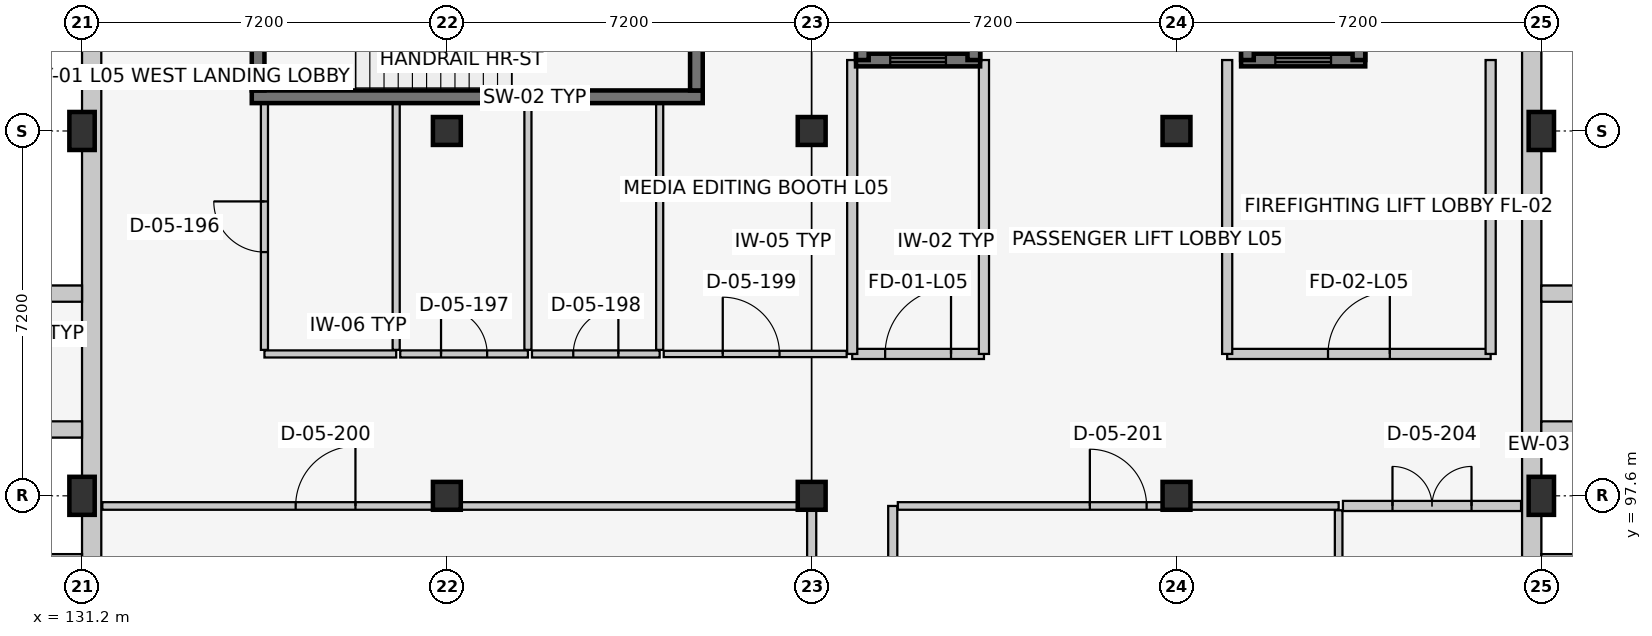
"""IFC4 building model, lengths in metres.
Left out: names, types, materials, properties, quantities, classifications, styles, units other than length and angle.
Written with IfcOpenShell. Run it as: python <this file> out.ifc"""

import sys

from ifc_helpers import new_model, si_unit, direction, frame, frame_2d, origin, origin_2d, place, context, subcontext, project, spatial, rectangle, extrude, element, fill, save


model = new_model("IFC4")
c1 = context("Model", 3, precision=1e-05, world=origin(), true_north=direction((0.0, 1.0)))
c2 = subcontext(c1, "Body", "Model", "MODEL_VIEW")
j1 = project(units=[si_unit("LENGTHUNIT", "METRE"), si_unit("PLANEANGLEUNIT", "RADIAN")], contexts=[c1])
p1 = place(None, origin())
s1 = spatial("IfcSite", under=j1, at=p1, CompositionType="ELEMENT")
p2 = place(p1, origin())
s2 = spatial("IfcBuilding", under=s1, at=p2, CompositionType="ELEMENT")
p3 = place(p2, frame((0.0, 0.0, 21.9)))
s3 = spatial("IfcBuildingStorey", under=s2, at=p3, CompositionType="ELEMENT", Elevation=21.9)
for number, where, z_axis, x_axis in (
    (1, (131.2, 97.6, 0.0), (0.0, 0.0, 1.0), (1.0, 0.0, 0.0)),
    (2, (131.2, 104.8, 0.0), (0.0, 0.0, 1.0), (1.0, 0.0, 0.0)),
):
    element("IfcColumn", number, at=place(p3, frame(where, z_axis=z_axis, x_axis=x_axis)), inside=s3, PredefinedType="COLUMN", context=c2, shape_type="SweptSolid", body=[
        extrude(rectangle(XDim=0.5, YDim=0.75, at=origin_2d()), origin(), (0.0, 0.0, 1.0), 3.9),
    ])
for number, where, z_axis, x_axis in (
    (3, (138.4, 97.6, 0.0), (0.0, 0.0, 1.0), (1.0, 0.0, 0.0)),
    (4, (138.4, 104.8, 0.0), (0.0, 0.0, 1.0), (1.0, 0.0, 0.0)),
    (5, (145.6, 97.6, 0.0), (0.0, 0.0, 1.0), (1.0, 0.0, 0.0)),
    (6, (145.6, 104.8, 0.0), (0.0, 0.0, 1.0), (1.0, 0.0, 0.0)),
    (7, (152.8, 97.6, 0.0), (0.0, 0.0, 1.0), (1.0, 0.0, 0.0)),
    (8, (152.8, 104.8, 0.0), (0.0, 0.0, 1.0), (1.0, 0.0, 0.0)),
):
    element("IfcColumn", number, at=place(p3, frame(where, z_axis=z_axis, x_axis=x_axis)), inside=s3, PredefinedType="COLUMN", context=c2, shape_type="SweptSolid", body=[
        extrude(rectangle(XDim=0.55, YDim=0.55, at=origin_2d()), origin(), (0.0, 0.0, 1.0), 3.9),
    ])
for number, where, z_axis, x_axis in (
    (9, (160.0, 97.6, 0.0), (0.0, 0.0, 1.0), (1.0, 0.0, 0.0)),
    (10, (160.0, 104.8, 0.0), (0.0, 0.0, 1.0), (1.0, 0.0, 0.0)),
):
    element("IfcColumn", number, at=place(p3, frame(where, z_axis=z_axis, x_axis=x_axis)), inside=s3, PredefinedType="COLUMN", context=c2, shape_type="SweptSolid", body=[
        extrude(rectangle(XDim=0.5, YDim=0.75, at=origin_2d()), origin(), (0.0, 0.0, 1.0), 3.9),
    ])
p4 = place(p3, frame((159.81, 112.0, 0.0), z_axis=(0.0, 0.0, 1.0), x_axis=(0.0, -1.0, 0.0)))
e11 = element("IfcWall", 11, at=p4, inside=s3, PredefinedType="SOLIDWALL", context=c2, shape_type="SweptSolid", body=[
    extrude(rectangle(XDim=28.8, YDim=0.38, at=frame_2d((14.4, 0.0))), origin(), (0.0, 0.0, 1.0), 2.915),
])
for number, where, z_axis, x_axis in (
    (12, (160.0, 96.29, 0.0), (0.0, 0.0, 1.0), (1.0, 0.0, 0.0)),
    (13, (160.0, 98.91, 0.0), (0.0, 0.0, 1.0), (1.0, 0.0, 0.0)),
):
    element("IfcWall", number, at=place(p3, frame(where, z_axis=z_axis, x_axis=x_axis)), inside=s3, PredefinedType="SOLIDWALL", context=c2, shape_type="SweptSolid", body=[
        extrude(rectangle(XDim=1.35, YDim=0.32, at=frame_2d((0.675, 0.0))), origin(), (0.0, 0.0, 1.0), 3.64),
    ])
p5 = place(p3, frame((160.0, 101.59, 0.0), z_axis=(0.0, 0.0, 1.0), x_axis=(1.0, 0.0, 0.0)))
e14 = element("IfcWall", 14, at=p5, inside=s3, PredefinedType="SOLIDWALL", context=c2, shape_type="SweptSolid", body=[
    extrude(rectangle(XDim=1.793, YDim=0.32, at=frame_2d((0.896, 0.0))), origin(), (0.0, 0.0, 1.0), 3.64),
])
p6 = place(p3, frame((131.39, 83.2, 0.0), z_axis=(0.0, 0.0, 1.0), x_axis=(0.0, 1.0, 0.0)))
e15 = element("IfcWall", 15, at=p6, inside=s3, PredefinedType="SOLIDWALL", context=c2, shape_type="SweptSolid", body=[
    extrude(rectangle(XDim=28.8, YDim=0.38, at=frame_2d((14.4, 0.0))), origin(), (0.0, 0.0, 1.0), 2.915),
])
for number, where, z_axis, x_axis in (
    (16, (131.2, 96.29, 0.0), (0.0, 0.0, 1.0), (-1.0, 0.0, 0.0)),
    (17, (131.2, 98.91, 0.0), (0.0, 0.0, 1.0), (-1.0, 0.0, 0.0)),
):
    element("IfcWall", number, at=place(p3, frame(where, z_axis=z_axis, x_axis=x_axis)), inside=s3, PredefinedType="SOLIDWALL", context=c2, shape_type="SweptSolid", body=[
        extrude(rectangle(XDim=1.793, YDim=0.32, at=frame_2d((0.896, 0.0))), origin(), (0.0, 0.0, 1.0), 3.64),
    ])
p7 = place(p3, frame((131.2, 101.59, 0.0), z_axis=(0.0, 0.0, 1.0), x_axis=(-1.0, 0.0, 0.0)))
e18 = element("IfcWall", 18, at=p7, inside=s3, PredefinedType="SOLIDWALL", context=c2, shape_type="SweptSolid", body=[
    extrude(rectangle(XDim=1.35, YDim=0.32, at=frame_2d((0.675, 0.0))), origin(), (0.0, 0.0, 1.0), 3.64),
])
p8 = place(p3, frame((134.55, 105.475, 0.0), z_axis=(0.0, 0.0, 1.0), x_axis=(1.0, 0.0, 0.0)))
e19 = element("IfcWall", 19, at=p8, inside=s3, PredefinedType="SHEAR", context=c2, shape_type="SweptSolid", body=[
    extrude(rectangle(XDim=8.9, YDim=0.25, at=frame_2d((4.45, 0.0))), origin(), (0.0, 0.0, 1.0), 3.66),
])
p9 = place(p3, frame((134.675, 109.45, 0.0), z_axis=(0.0, 0.0, 1.0), x_axis=(0.0, -1.0, 0.0)))
e20 = element("IfcWall", 20, at=p9, inside=s3, PredefinedType="SHEAR", context=c2, shape_type="SweptSolid", body=[
    extrude(rectangle(XDim=3.85, YDim=0.25, at=frame_2d((1.925, 0.0))), origin(), (0.0, 0.0, 1.0), 3.66),
])
p10 = place(p9, frame((1.3, 0.0, 0.0)))
e21 = element("IfcOpeningElement", 21, at=p10, cuts=e20, PredefinedType="OPENING", context=c2, shape_type="SweptSolid", body=[
    extrude(rectangle(XDim=1.25, YDim=2.15, at=frame_2d((0.625, 1.075))), frame((0.0, 0.137, 0.0), z_axis=(0.0, -1.0, 0.0), x_axis=(1.0, 0.0, 0.0)), (0.0, 0.0, 1.0), 0.274),
])
p11 = place(p3, frame((143.325, 105.6, 0.0), z_axis=(0.0, 0.0, 1.0), x_axis=(0.0, 1.0, 0.0)))
e22 = element("IfcWall", 22, at=p11, inside=s3, PredefinedType="SHEAR", context=c2, shape_type="SweptSolid", body=[
    extrude(rectangle(XDim=3.85, YDim=0.25, at=frame_2d((1.925, 0.0))), origin(), (0.0, 0.0, 1.0), 3.66),
])
p12 = place(p3, frame((146.475, 106.2, 0.0), z_axis=(0.0, 0.0, 1.0), x_axis=(1.0, 0.0, 0.0)))
e23 = element("IfcWall", 23, at=p12, inside=s3, PredefinedType="SHEAR", context=c2, shape_type="SweptSolid", body=[
    extrude(rectangle(XDim=2.45, YDim=0.25, at=frame_2d((1.225, 0.0))), origin(), (0.0, 0.0, 1.0), 3.66),
])
p13 = place(p12, frame((0.675, 0.0, 0.0)))
e24 = element("IfcOpeningElement", 24, at=p13, cuts=e23, PredefinedType="OPENING", context=c2, shape_type="SweptSolid", body=[
    extrude(rectangle(XDim=1.1, YDim=2.15, at=frame_2d((0.55, 1.075))), frame((0.0, 0.137, 0.0), z_axis=(0.0, -1.0, 0.0), x_axis=(1.0, 0.0, 0.0)), (0.0, 0.0, 1.0), 0.274),
])
for number, where, z_axis, x_axis in (
    (25, (146.6, 109.2, 0.0), (0.0, 0.0, 1.0), (0.0, -1.0, 0.0)),
    (26, (148.8, 106.2, 0.0), (0.0, 0.0, 1.0), (0.0, 1.0, 0.0)),
):
    element("IfcWall", number, at=place(p3, frame(where, z_axis=z_axis, x_axis=x_axis)), inside=s3, PredefinedType="SHEAR", context=c2, shape_type="SweptSolid", body=[
        extrude(rectangle(XDim=3.0, YDim=0.25, at=frame_2d((1.5, 0.0))), origin(), (0.0, 0.0, 1.0), 3.66),
    ])
p14 = place(p3, frame((146.4, 100.4, 0.0), z_axis=(0.0, 0.0, 1.0), x_axis=(1.0, 0.0, 0.0)))
e27 = element("IfcWall", 27, at=p14, inside=s3, PredefinedType="PARTITIONING", context=c2, shape_type="SweptSolid", body=[
    extrude(rectangle(XDim=2.6, YDim=0.2, at=frame_2d((1.3, 0.0))), origin(), (0.0, 0.0, 1.0), 3.66),
])
p15 = place(p14, frame((0.65, 0.0, 0.0)))
e28 = element("IfcOpeningElement", 28, at=p15, cuts=e27, PredefinedType="OPENING", context=c2, shape_type="SweptSolid", body=[
    extrude(rectangle(XDim=1.3, YDim=2.2, at=frame_2d((0.65, 1.1))), frame((0.0, 0.112, 0.0), z_axis=(0.0, -1.0, 0.0), x_axis=(1.0, 0.0, 0.0)), (0.0, 0.0, 1.0), 0.224),
])
p16 = place(p3, frame((146.4, 106.2, 0.0), z_axis=(0.0, 0.0, 1.0), x_axis=(0.0, -1.0, 0.0)))
e29 = element("IfcWall", 29, at=p16, inside=s3, PredefinedType="PARTITIONING", context=c2, shape_type="SweptSolid", body=[
    extrude(rectangle(XDim=5.8, YDim=0.2, at=frame_2d((2.9, 0.0))), origin(), (0.0, 0.0, 1.0), 3.66),
])
p17 = place(p3, frame((149.0, 100.4, 0.0), z_axis=(0.0, 0.0, 1.0), x_axis=(0.0, 1.0, 0.0)))
e30 = element("IfcWall", 30, at=p17, inside=s3, PredefinedType="PARTITIONING", context=c2, shape_type="SweptSolid", body=[
    extrude(rectangle(XDim=5.8, YDim=0.2, at=frame_2d((2.9, 0.0))), origin(), (0.0, 0.0, 1.0), 3.335),
])
p18 = place(p3, frame((154.075, 106.2, 0.0), z_axis=(0.0, 0.0, 1.0), x_axis=(1.0, 0.0, 0.0)))
e31 = element("IfcWall", 31, at=p18, inside=s3, PredefinedType="SHEAR", context=c2, shape_type="SweptSolid", body=[
    extrude(rectangle(XDim=2.45, YDim=0.25, at=frame_2d((1.225, 0.0))), origin(), (0.0, 0.0, 1.0), 3.66),
])
p19 = place(p18, frame((0.675, 0.0, 0.0)))
e32 = element("IfcOpeningElement", 32, at=p19, cuts=e31, PredefinedType="OPENING", context=c2, shape_type="SweptSolid", body=[
    extrude(rectangle(XDim=1.1, YDim=2.15, at=frame_2d((0.55, 1.075))), frame((0.0, 0.137, 0.0), z_axis=(0.0, -1.0, 0.0), x_axis=(1.0, 0.0, 0.0)), (0.0, 0.0, 1.0), 0.274),
])
for number, where, z_axis, x_axis in (
    (33, (154.2, 109.2, 0.0), (0.0, 0.0, 1.0), (0.0, -1.0, 0.0)),
    (34, (156.4, 106.2, 0.0), (0.0, 0.0, 1.0), (0.0, 1.0, 0.0)),
):
    element("IfcWall", number, at=place(p3, frame(where, z_axis=z_axis, x_axis=x_axis)), inside=s3, PredefinedType="SHEAR", context=c2, shape_type="SweptSolid", body=[
        extrude(rectangle(XDim=3.0, YDim=0.25, at=frame_2d((1.5, 0.0))), origin(), (0.0, 0.0, 1.0), 3.66),
    ])
p20 = place(p3, frame((153.8, 100.4, 0.0), z_axis=(0.0, 0.0, 1.0), x_axis=(1.0, 0.0, 0.0)))
e35 = element("IfcWall", 35, at=p20, inside=s3, PredefinedType="PARTITIONING", context=c2, shape_type="SweptSolid", body=[
    extrude(rectangle(XDim=5.2, YDim=0.2, at=frame_2d((2.6, 0.0))), origin(), (0.0, 0.0, 1.0), 3.66),
])
p21 = place(p20, frame((1.99, 0.0, 0.0)))
e36 = element("IfcOpeningElement", 36, at=p21, cuts=e35, PredefinedType="OPENING", context=c2, shape_type="SweptSolid", body=[
    extrude(rectangle(XDim=1.22, YDim=2.2, at=frame_2d((0.61, 1.1))), frame((0.0, 0.112, 0.0), z_axis=(0.0, -1.0, 0.0), x_axis=(1.0, 0.0, 0.0)), (0.0, 0.0, 1.0), 0.224),
])
for number, where, z_axis, x_axis in (
    (37, (153.8, 106.2, 0.0), (0.0, 0.0, 1.0), (0.0, -1.0, 0.0)),
    (38, (159.0, 100.4, 0.0), (0.0, 0.0, 1.0), (0.0, 1.0, 0.0)),
):
    element("IfcWall", number, at=place(p3, frame(where, z_axis=z_axis, x_axis=x_axis)), inside=s3, PredefinedType="PARTITIONING", context=c2, shape_type="SweptSolid", body=[
        extrude(rectangle(XDim=5.8, YDim=0.2, at=frame_2d((2.9, 0.0))), origin(), (0.0, 0.0, 1.0), 3.66),
    ])
p22 = place(p3, frame((145.6, 90.4, 0.0), z_axis=(0.0, 0.0, 1.0), x_axis=(0.0, 1.0, 0.0)))
e39 = element("IfcWall", 39, at=p22, inside=s3, PredefinedType="PARTITIONING", context=c2, shape_type="SweptSolid", body=[
    extrude(rectangle(XDim=7.0, YDim=0.18, at=frame_2d((3.5, 0.0))), origin(), (0.0, 0.0, 1.0), 3.035),
])
p23 = place(p3, frame((147.2, 90.4, 0.0), z_axis=(0.0, 0.0, 1.0), x_axis=(0.0, 1.0, 0.0)))
e40 = element("IfcWall", 40, at=p23, inside=s3, PredefinedType="PARTITIONING", context=c2, shape_type="SweptSolid", body=[
    extrude(rectangle(XDim=7.0, YDim=0.18, at=frame_2d((3.5, 0.0))), origin(), (0.0, 0.0, 1.0), 3.66),
])
p24 = place(p3, frame((134.8, 100.4, 0.0), z_axis=(0.0, 0.0, 1.0), x_axis=(1.0, 0.0, 0.0)))
e41 = element("IfcWall", 41, at=p24, inside=s3, PredefinedType="PARTITIONING", context=c2, shape_type="SweptSolid", body=[
    extrude(rectangle(XDim=2.6, YDim=0.14, at=frame_2d((1.3, 0.0))), origin(), (0.0, 0.0, 1.0), 3.66),
])
p25 = place(p3, frame((134.8, 100.48, 0.0), z_axis=(0.0, 0.0, 1.0), x_axis=(0.0, 1.0, 0.0)))
e42 = element("IfcWall", 42, at=p25, inside=s3, PredefinedType="PARTITIONING", context=c2, shape_type="SweptSolid", body=[
    extrude(rectangle(XDim=4.86, YDim=0.14, at=frame_2d((2.43, 0.0))), origin(), (0.0, 0.0, 1.0), 3.275),
])
p26 = place(p25, frame((1.93, 0.0, 0.0)))
e43 = element("IfcOpeningElement", 43, at=p26, cuts=e42, PredefinedType="OPENING", context=c2, shape_type="SweptSolid", body=[
    extrude(rectangle(XDim=1.0, YDim=2.1, at=frame_2d((0.5, 1.05))), frame((0.0, 0.082, 0.0), z_axis=(0.0, -1.0, 0.0), x_axis=(1.0, 0.0, 0.0)), (0.0, 0.0, 1.0), 0.164),
])
p27 = place(p3, frame((137.4, 100.48, 0.0), z_axis=(0.0, 0.0, 1.0), x_axis=(0.0, 1.0, 0.0)))
e44 = element("IfcWall", 44, at=p27, inside=s3, PredefinedType="PARTITIONING", context=c2, shape_type="SweptSolid", body=[
    extrude(rectangle(XDim=4.86, YDim=0.14, at=frame_2d((2.43, 0.0))), origin(), (0.0, 0.0, 1.0), 3.66),
])
p28 = place(p3, frame((137.48, 100.4, 0.0), z_axis=(0.0, 0.0, 1.0), x_axis=(1.0, 0.0, 0.0)))
e45 = element("IfcWall", 45, at=p28, inside=s3, PredefinedType="PARTITIONING", context=c2, shape_type="SweptSolid", body=[
    extrude(rectangle(XDim=2.52, YDim=0.14, at=frame_2d((1.26, 0.0))), origin(), (0.0, 0.0, 1.0), 3.66),
])
p29 = place(p28, frame((0.805, 0.0, 0.0)))
e46 = element("IfcOpeningElement", 46, at=p29, cuts=e45, PredefinedType="OPENING", context=c2, shape_type="SweptSolid", body=[
    extrude(rectangle(XDim=0.91, YDim=2.06, at=frame_2d((0.455, 1.03))), frame((0.0, 0.082, 0.0), z_axis=(0.0, -1.0, 0.0), x_axis=(1.0, 0.0, 0.0)), (0.0, 0.0, 1.0), 0.164),
])
p30 = place(p3, frame((140.0, 100.48, 0.0), z_axis=(0.0, 0.0, 1.0), x_axis=(0.0, 1.0, 0.0)))
e47 = element("IfcWall", 47, at=p30, inside=s3, PredefinedType="PARTITIONING", context=c2, shape_type="SweptSolid", body=[
    extrude(rectangle(XDim=4.86, YDim=0.14, at=frame_2d((2.43, 0.0))), origin(), (0.0, 0.0, 1.0), 3.66),
])
p31 = place(p3, frame((140.08, 100.4, 0.0), z_axis=(0.0, 0.0, 1.0), x_axis=(1.0, 0.0, 0.0)))
e48 = element("IfcWall", 48, at=p31, inside=s3, PredefinedType="PARTITIONING", context=c2, shape_type="SweptSolid", body=[
    extrude(rectangle(XDim=2.52, YDim=0.14, at=frame_2d((1.26, 0.0))), origin(), (0.0, 0.0, 1.0), 3.66),
])
p32 = place(p31, frame((0.815, 0.0, 0.0)))
e49 = element("IfcOpeningElement", 49, at=p32, cuts=e48, PredefinedType="OPENING", context=c2, shape_type="SweptSolid", body=[
    extrude(rectangle(XDim=0.89, YDim=2.05, at=frame_2d((0.445, 1.025))), frame((0.0, 0.082, 0.0), z_axis=(0.0, -1.0, 0.0), x_axis=(1.0, 0.0, 0.0)), (0.0, 0.0, 1.0), 0.164),
])
p33 = place(p3, frame((142.6, 100.48, 0.0), z_axis=(0.0, 0.0, 1.0), x_axis=(0.0, 1.0, 0.0)))
e50 = element("IfcWall", 50, at=p33, inside=s3, PredefinedType="PARTITIONING", context=c2, shape_type="SweptSolid", body=[
    extrude(rectangle(XDim=4.86, YDim=0.14, at=frame_2d((2.43, 0.0))), origin(), (0.0, 0.0, 1.0), 3.66),
])
p34 = place(p3, frame((142.68, 100.4, 0.0), z_axis=(0.0, 0.0, 1.0), x_axis=(1.0, 0.0, 0.0)))
e51 = element("IfcWall", 51, at=p34, inside=s3, PredefinedType="PARTITIONING", context=c2, shape_type="SweptSolid", body=[
    extrude(rectangle(XDim=3.61, YDim=0.125, at=frame_2d((1.805, 0.0))), origin(), (0.0, 0.0, 1.0), 3.66),
])
p35 = place(p34, frame((1.165, 0.0, 0.0)))
e52 = element("IfcOpeningElement", 52, at=p35, cuts=e51, PredefinedType="OPENING", context=c2, shape_type="SweptSolid", body=[
    extrude(rectangle(XDim=1.12, YDim=2.15, at=frame_2d((0.56, 1.075))), frame((0.0, 0.074, 0.0), z_axis=(0.0, -1.0, 0.0), x_axis=(1.0, 0.0, 0.0)), (0.0, 0.0, 1.0), 0.149),
])
p36 = place(p3, frame((131.6, 97.4, 0.0), z_axis=(0.0, 0.0, 1.0), x_axis=(1.0, 0.0, 0.0)))
e53 = element("IfcWall", 53, at=p36, inside=s3, PredefinedType="PARTITIONING", context=c2, shape_type="SweptSolid", body=[
    extrude(rectangle(XDim=13.9, YDim=0.15, at=frame_2d((6.95, 0.0))), origin(), (0.0, 0.0, 1.0), 2.785),
])
p37 = place(p36, frame((3.816, 0.0, 0.0)))
e54 = element("IfcOpeningElement", 54, at=p37, cuts=e53, PredefinedType="OPENING", context=c2, shape_type="SweptSolid", body=[
    extrude(rectangle(XDim=1.18, YDim=2.2, at=frame_2d((0.59, 1.1))), frame((0.0, 0.087, 0.0), z_axis=(0.0, -1.0, 0.0), x_axis=(1.0, 0.0, 0.0)), (0.0, 0.0, 1.0), 0.174),
])
p38 = place(p3, frame((147.3, 97.4, 0.0), z_axis=(0.0, 0.0, 1.0), x_axis=(1.0, 0.0, 0.0)))
e55 = element("IfcWall", 55, at=p38, inside=s3, PredefinedType="PARTITIONING", context=c2, shape_type="SweptSolid", body=[
    extrude(rectangle(XDim=8.7, YDim=0.15, at=frame_2d((4.35, 0.0))), origin(), (0.0, 0.0, 1.0), 2.935),
])
p39 = place(p38, frame((3.79, 0.0, 0.0)))
e56 = element("IfcOpeningElement", 56, at=p39, cuts=e55, PredefinedType="OPENING", context=c2, shape_type="SweptSolid", body=[
    extrude(rectangle(XDim=1.12, YDim=2.15, at=frame_2d((0.56, 1.075))), frame((0.0, 0.087, 0.0), z_axis=(0.0, -1.0, 0.0), x_axis=(1.0, 0.0, 0.0)), (0.0, 0.0, 1.0), 0.174),
])
p40 = place(p3, frame((156.0, 88.71, 0.0), z_axis=(0.0, 0.0, 1.0), x_axis=(0.0, 1.0, 0.0)))
e57 = element("IfcWall", 57, at=p40, inside=s3, PredefinedType="PARTITIONING", context=c2, shape_type="SweptSolid", body=[
    extrude(rectangle(XDim=8.605, YDim=0.15, at=frame_2d((4.302, 0.0))), origin(), (0.0, 0.0, 1.0), 3.66),
])
p41 = place(p3, frame((156.085, 97.4, 0.0), z_axis=(0.0, 0.0, 1.0), x_axis=(1.0, 0.0, 0.0)))
e58 = element("IfcWall", 58, at=p41, inside=s3, PredefinedType="PARTITIONING", context=c2, shape_type="SweptSolid", body=[
    extrude(rectangle(XDim=3.515, YDim=0.2, at=frame_2d((1.758, 0.0))), origin(), (0.0, 0.0, 1.0), 2.935),
])
p42 = place(p41, frame((0.978, 0.0, 0.0)))
e59 = element("IfcOpeningElement", 59, at=p42, cuts=e58, PredefinedType="OPENING", context=c2, shape_type="SweptSolid", body=[
    extrude(rectangle(XDim=1.56, YDim=2.25, at=frame_2d((0.78, 1.125))), frame((0.0, 0.112, 0.0), z_axis=(0.0, -1.0, 0.0), x_axis=(1.0, 0.0, 0.0)), (0.0, 0.0, 1.0), 0.224),
])
p43 = place(p13, origin())
e60 = element("IfcDoor", 60, at=p43, inside=s3, OperationType="SLIDING_TO_LEFT", PredefinedType="DOOR", context=c2, shape_type="SweptSolid", body=[
    extrude(rectangle(XDim=1.1, YDim=2.15, at=frame_2d((0.55, 1.075))), frame((0.0, 0.025, 0.0), z_axis=(0.0, -1.0, 0.0), x_axis=(1.0, 0.0, 0.0)), (0.0, 0.0, 1.0), 0.05),
])
fill(e24, e60)
p44 = place(p15, origin())
e61 = element("IfcDoor", 61, at=p44, inside=s3, OperationType="SINGLE_SWING_RIGHT", PredefinedType="DOOR", context=c2, shape_type="SweptSolid", body=[
    extrude(rectangle(XDim=1.3, YDim=2.2, at=frame_2d((0.65, 1.1))), frame((0.0, 0.025, 0.0), z_axis=(0.0, -1.0, 0.0), x_axis=(1.0, 0.0, 0.0)), (0.0, 0.0, 1.0), 0.05),
])
fill(e28, e61)
p45 = place(p19, origin())
e62 = element("IfcDoor", 62, at=p45, inside=s3, OperationType="SLIDING_TO_LEFT", PredefinedType="DOOR", context=c2, shape_type="SweptSolid", body=[
    extrude(rectangle(XDim=1.1, YDim=2.15, at=frame_2d((0.55, 1.075))), frame((0.0, 0.025, 0.0), z_axis=(0.0, -1.0, 0.0), x_axis=(1.0, 0.0, 0.0)), (0.0, 0.0, 1.0), 0.05),
])
fill(e32, e62)
p46 = place(p21, origin())
e63 = element("IfcDoor", 63, at=p46, inside=s3, OperationType="SINGLE_SWING_RIGHT", PredefinedType="DOOR", context=c2, shape_type="SweptSolid", body=[
    extrude(rectangle(XDim=1.22, YDim=2.2, at=frame_2d((0.61, 1.1))), frame((0.0, 0.025, 0.0), z_axis=(0.0, -1.0, 0.0), x_axis=(1.0, 0.0, 0.0)), (0.0, 0.0, 1.0), 0.05),
])
fill(e36, e63)
p47 = place(p26, origin())
e64 = element("IfcDoor", 64, at=p47, inside=s3, OperationType="SINGLE_SWING_RIGHT", PredefinedType="DOOR", context=c2, shape_type="SweptSolid", body=[
    extrude(rectangle(XDim=1.0, YDim=2.1, at=frame_2d((0.5, 1.05))), frame((0.0, 0.025, 0.0), z_axis=(0.0, -1.0, 0.0), x_axis=(1.0, 0.0, 0.0)), (0.0, 0.0, 1.0), 0.05),
])
fill(e43, e64)
p48 = place(p29, origin())
e65 = element("IfcDoor", 65, at=p48, inside=s3, OperationType="SINGLE_SWING_LEFT", PredefinedType="DOOR", context=c2, shape_type="SweptSolid", body=[
    extrude(rectangle(XDim=0.91, YDim=2.06, at=frame_2d((0.455, 1.03))), frame((0.0, 0.025, 0.0), z_axis=(0.0, -1.0, 0.0), x_axis=(1.0, 0.0, 0.0)), (0.0, 0.0, 1.0), 0.05),
])
fill(e46, e65)
p49 = place(p32, origin())
e66 = element("IfcDoor", 66, at=p49, inside=s3, OperationType="SINGLE_SWING_RIGHT", PredefinedType="DOOR", context=c2, shape_type="SweptSolid", body=[
    extrude(rectangle(XDim=0.89, YDim=2.05, at=frame_2d((0.445, 1.025))), frame((0.0, 0.025, 0.0), z_axis=(0.0, -1.0, 0.0), x_axis=(1.0, 0.0, 0.0)), (0.0, 0.0, 1.0), 0.05),
])
fill(e49, e66)
p50 = place(p35, origin())
e67 = element("IfcDoor", 67, at=p50, inside=s3, OperationType="SINGLE_SWING_LEFT", PredefinedType="DOOR", context=c2, shape_type="SweptSolid", body=[
    extrude(rectangle(XDim=1.12, YDim=2.15, at=frame_2d((0.56, 1.075))), frame((0.0, 0.025, 0.0), z_axis=(0.0, -1.0, 0.0), x_axis=(1.0, 0.0, 0.0)), (0.0, 0.0, 1.0), 0.05),
])
fill(e52, e67)
p51 = place(p37, origin())
e68 = element("IfcDoor", 68, at=p51, inside=s3, OperationType="SINGLE_SWING_RIGHT", PredefinedType="DOOR", context=c2, shape_type="SweptSolid", body=[
    extrude(rectangle(XDim=1.18, YDim=2.2, at=frame_2d((0.59, 1.1))), frame((0.0, 0.025, 0.0), z_axis=(0.0, -1.0, 0.0), x_axis=(1.0, 0.0, 0.0)), (0.0, 0.0, 1.0), 0.05),
])
fill(e54, e68)
p52 = place(p39, origin())
e69 = element("IfcDoor", 69, at=p52, inside=s3, OperationType="SINGLE_SWING_LEFT", PredefinedType="DOOR", context=c2, shape_type="SweptSolid", body=[
    extrude(rectangle(XDim=1.12, YDim=2.15, at=frame_2d((0.56, 1.075))), frame((0.0, 0.025, 0.0), z_axis=(0.0, -1.0, 0.0), x_axis=(1.0, 0.0, 0.0)), (0.0, 0.0, 1.0), 0.05),
])
fill(e56, e69)
p53 = place(p42, origin())
e70 = element("IfcDoor", 70, at=p53, inside=s3, OperationType="DOUBLE_DOOR_SINGLE_SWING", PredefinedType="DOOR", context=c2, shape_type="SweptSolid", body=[
    extrude(rectangle(XDim=1.56, YDim=2.25, at=frame_2d((0.78, 1.125))), frame((0.0, 0.025, 0.0), z_axis=(0.0, -1.0, 0.0), x_axis=(1.0, 0.0, 0.0)), (0.0, 0.0, 1.0), 0.05),
])
fill(e59, e70)
save(model, sys.argv[1])
